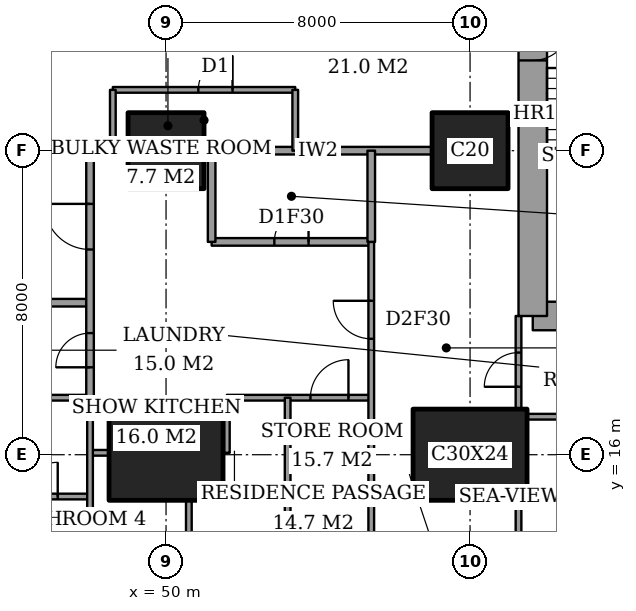
"""IFC4 building model, lengths in metres.
Left out: names, types, materials, properties, quantities, classifications, styles, units other than length and angle.
Written with IfcOpenShell. Run it as: python <this file> out.ifc"""

import sys

from ifc_helpers import new_model, si_unit, direction, frame, frame_2d, origin, origin_2d, place, context, subcontext, project, spatial, rectangle, extrude, element, fill, save


model = new_model("IFC4")
c1 = context("Model", 3, precision=1e-05, world=origin(), true_north=direction((0.0, 1.0)))
c2 = subcontext(c1, "Body", "Model", "MODEL_VIEW")
j1 = project(units=[si_unit("LENGTHUNIT", "METRE"), si_unit("PLANEANGLEUNIT", "RADIAN")], contexts=[c1])
p1 = place(None, origin())
s1 = spatial("IfcSite", under=j1, at=p1, CompositionType="ELEMENT")
p2 = place(p1, origin())
s2 = spatial("IfcBuilding", under=s1, at=p2, CompositionType="ELEMENT")
p3 = place(p2, frame((0.0, 0.0, 47.6)))
s3 = spatial("IfcBuildingStorey", under=s2, at=p3, CompositionType="ELEMENT", Elevation=47.6)
p4 = place(p3, frame((50.0, 16.0, 0.0), z_axis=(0.0, 0.0, 1.0), x_axis=(1.0, 0.0, 0.0)))
e1 = element("IfcColumn", 1, at=p4, inside=s3, PredefinedType="COLUMN", context=c2, shape_type="SweptSolid", body=[
    extrude(rectangle(XDim=3.0, YDim=2.4, at=origin_2d()), origin(), (0.0, 0.0, 1.0), 3.6),
])
p5 = place(p3, frame((50.0, 24.0, 0.0), z_axis=(0.0, 0.0, 1.0), x_axis=(1.0, 0.0, 0.0)))
e2 = element("IfcColumn", 2, at=p5, inside=s3, PredefinedType="COLUMN", context=c2, shape_type="SweptSolid", body=[
    extrude(rectangle(XDim=2.0, YDim=2.0, at=origin_2d()), origin(), (0.0, 0.0, 1.0), 3.6),
])
p6 = place(p3, frame((58.0, 16.0, 0.0), z_axis=(0.0, 0.0, 1.0), x_axis=(1.0, 0.0, 0.0)))
e3 = element("IfcColumn", 3, at=p6, inside=s3, PredefinedType="COLUMN", context=c2, shape_type="SweptSolid", body=[
    extrude(rectangle(XDim=3.0, YDim=2.4, at=origin_2d()), origin(), (0.0, 0.0, 1.0), 3.6),
])
p7 = place(p3, frame((58.0, 24.0, 0.0), z_axis=(0.0, 0.0, 1.0), x_axis=(1.0, 0.0, 0.0)))
e4 = element("IfcColumn", 4, at=p7, inside=s3, PredefinedType="COLUMN", context=c2, shape_type="SweptSolid", body=[
    extrude(rectangle(XDim=2.0, YDim=2.0, at=origin_2d()), origin(), (0.0, 0.0, 1.0), 3.6),
])
p8 = place(p3, frame((59.65, 19.65, 0.0), z_axis=(0.0, 0.0, 1.0), x_axis=(1.0, 0.0, 0.0)))
e5 = element("IfcWall", 5, at=p8, inside=s3, PredefinedType="SHEAR", context=c2, shape_type="SweptSolid", body=[
    extrude(rectangle(XDim=4.45, YDim=0.75, at=frame_2d((2.225, 0.0))), origin(), (0.0, 0.0, 1.0), 3.6),
])
p9 = place(p3, frame((59.65, 28.35, 0.0), z_axis=(0.0, 0.0, 1.0), x_axis=(0.0, -1.0, 0.0)))
e6 = element("IfcWall", 6, at=p9, inside=s3, PredefinedType="SHEAR", context=c2, shape_type="SweptSolid", body=[
    extrude(rectangle(XDim=8.7, YDim=0.75, at=frame_2d((4.35, 0.0))), origin(), (0.0, 0.0, 1.0), 3.6),
])
p10 = place(p9, frame((0.975, 0.0, 0.0)))
e7 = element("IfcOpeningElement", 7, at=p10, cuts=e6, PredefinedType="OPENING", context=c2, shape_type="SweptSolid", body=[
    extrude(rectangle(XDim=1.0, YDim=2.1, at=frame_2d((0.5, 1.05))), frame((0.0, 0.385, 0.0), z_axis=(0.0, -1.0, 0.0), x_axis=(1.0, 0.0, 0.0)), (0.0, 0.0, 1.0), 0.77),
])
p11 = place(p3, frame((45.4, 14.9, 0.0), z_axis=(0.0, 0.0, 1.0), x_axis=(1.0, 0.0, 0.0)))
e8 = element("IfcWall", 8, at=p11, inside=s3, PredefinedType="PARTITIONING", context=c2, shape_type="SweptSolid", body=[
    extrude(rectangle(XDim=2.6, YDim=0.15, at=frame_2d((1.3, 0.0))), origin(), (0.0, 0.0, 1.0), 3.35),
])
p12 = place(p11, frame((0.85, 0.0, 0.0)))
e9 = element("IfcOpeningElement", 9, at=p12, cuts=e8, PredefinedType="OPENING", context=c2, shape_type="SweptSolid", body=[
    extrude(rectangle(XDim=0.9, YDim=2.1, at=frame_2d((0.45, 1.05))), frame((0.0, 0.085, 0.0), z_axis=(0.0, -1.0, 0.0), x_axis=(1.0, 0.0, 0.0)), (0.0, 0.0, 1.0), 0.17),
])
p13 = place(p3, frame((55.4, 15.0, 0.0), z_axis=(0.0, 0.0, 1.0), x_axis=(1.0, 0.0, 0.0)))
e10 = element("IfcWall", 10, at=p13, inside=s3, PredefinedType="PARTITIONING", context=c2, shape_type="SweptSolid", body=[
    extrude(rectangle(XDim=1.1, YDim=0.15, at=frame_2d((0.55, 0.0))), origin(), (0.0, 0.0, 1.0), 3.35),
])
p14 = place(p3, frame((48.0, 16.05, 0.0), z_axis=(0.0, 0.0, 1.0), x_axis=(1.0, 0.0, 0.0)))
e11 = element("IfcWall", 11, at=p14, inside=s3, PredefinedType="PARTITIONING", context=c2, shape_type="SweptSolid", body=[
    extrude(rectangle(XDim=0.5, YDim=0.15, at=frame_2d((0.25, 0.0))), origin(), (0.0, 0.0, 1.0), 2.634),
])
p15 = place(p3, frame((59.5, 17.0, 0.0), z_axis=(0.0, 0.0, 1.0), x_axis=(1.0, 0.0, 0.0)))
e12 = element("IfcWall", 12, at=p15, inside=s3, PredefinedType="PARTITIONING", context=c2, shape_type="SweptSolid", body=[
    extrude(rectangle(XDim=5.15, YDim=0.15, at=frame_2d((2.575, 0.0))), origin(), (0.0, 0.0, 1.0), 3.35),
])
p16 = place(p3, frame((42.0, 17.5, 0.0), z_axis=(0.0, 0.0, 1.0), x_axis=(1.0, 0.0, 0.0)))
e13 = element("IfcWall", 13, at=p16, inside=s3, PredefinedType="PARTITIONING", context=c2, shape_type="SweptSolid", body=[
    extrude(rectangle(XDim=6.0, YDim=0.15, at=frame_2d((3.0, 0.0))), origin(), (0.0, 0.0, 1.0), 3.35),
])
p17 = place(p3, frame((51.6, 17.5, 0.0), z_axis=(0.0, 0.0, 1.0), x_axis=(1.0, 0.0, 0.0)))
e14 = element("IfcWall", 14, at=p17, inside=s3, PredefinedType="PARTITIONING", context=c2, shape_type="SweptSolid", body=[
    extrude(rectangle(XDim=3.8, YDim=0.15, at=frame_2d((1.9, 0.0))), origin(), (0.0, 0.0, 1.0), 3.35),
])
p18 = place(p17, frame((2.2, 0.0, 0.0)))
e15 = element("IfcOpeningElement", 15, at=p18, cuts=e14, PredefinedType="OPENING", context=c2, shape_type="SweptSolid", body=[
    extrude(rectangle(XDim=1.0, YDim=2.1, at=frame_2d((0.5, 1.05))), frame((0.0, 0.085, 0.0), z_axis=(0.0, -1.0, 0.0), x_axis=(1.0, 0.0, 0.0)), (0.0, 0.0, 1.0), 0.17),
])
p19 = place(p3, frame((42.0, 20.0, 0.0), z_axis=(0.0, 0.0, 1.0), x_axis=(1.0, 0.0, 0.0)))
e16 = element("IfcWall", 16, at=p19, inside=s3, PredefinedType="PARTITIONING", context=c2, shape_type="SweptSolid", body=[
    extrude(rectangle(XDim=6.0, YDim=0.2, at=frame_2d((3.0, 0.0))), origin(), (0.0, 0.0, 1.0), 3.35),
])
p20 = place(p3, frame((51.2, 21.6, 0.0), z_axis=(0.0, 0.0, 1.0), x_axis=(1.0, 0.0, 0.0)))
e17 = element("IfcWall", 17, at=p20, inside=s3, PredefinedType="PARTITIONING", context=c2, shape_type="SweptSolid", body=[
    extrude(rectangle(XDim=4.2, YDim=0.2, at=frame_2d((2.1, 0.0))), origin(), (0.0, 0.0, 1.0), 3.35),
])
p21 = place(p20, frame((1.65, 0.0, 0.0)))
e18 = element("IfcOpeningElement", 18, at=p21, cuts=e17, PredefinedType="OPENING", context=c2, shape_type="SweptSolid", body=[
    extrude(rectangle(XDim=0.9, YDim=2.1, at=frame_2d((0.45, 1.05))), frame((0.0, 0.11, 0.0), z_axis=(0.0, -1.0, 0.0), x_axis=(1.0, 0.0, 0.0)), (0.0, 0.0, 1.0), 0.22),
])
p22 = place(p3, frame((48.0, 24.0, 0.0), z_axis=(0.0, 0.0, 1.0), x_axis=(1.0, 0.0, 0.0)))
e19 = element("IfcWall", 19, at=p22, inside=s3, PredefinedType="PARTITIONING", context=c2, shape_type="SweptSolid", body=[
    extrude(rectangle(XDim=1.0, YDim=0.2, at=frame_2d((0.5, 0.0))), origin(), (0.0, 0.0, 1.0), 3.35),
])
p23 = place(p3, frame((51.0, 24.0, 0.0), z_axis=(0.0, 0.0, 1.0), x_axis=(1.0, 0.0, 0.0)))
e20 = element("IfcWall", 20, at=p23, inside=s3, PredefinedType="PARTITIONING", context=c2, shape_type="SweptSolid", body=[
    extrude(rectangle(XDim=6.0, YDim=0.2, at=frame_2d((3.0, 0.0))), origin(), (0.0, 0.0, 1.0), 3.35),
])
p24 = place(p3, frame((48.6, 25.6, 0.0), z_axis=(0.0, 0.0, 1.0), x_axis=(1.0, 0.0, 0.0)))
e21 = element("IfcWall", 21, at=p24, inside=s3, PredefinedType="PARTITIONING", context=c2, shape_type="SweptSolid", body=[
    extrude(rectangle(XDim=4.8, YDim=0.15, at=frame_2d((2.4, 0.0))), origin(), (0.0, 0.0, 1.0), 3.35),
])
p25 = place(p24, frame((2.25, 0.0, 0.0)))
e22 = element("IfcOpeningElement", 22, at=p25, cuts=e21, PredefinedType="OPENING", context=c2, shape_type="SweptSolid", body=[
    extrude(rectangle(XDim=0.9, YDim=2.1, at=frame_2d((0.45, 1.05))), frame((0.0, 0.085, 0.0), z_axis=(0.0, -1.0, 0.0), x_axis=(1.0, 0.0, 0.0)), (0.0, 0.0, 1.0), 0.17),
])
p26 = place(p3, frame((48.0, 17.5, 0.0), z_axis=(0.0, 0.0, 1.0), x_axis=(0.0, 1.0, 0.0)))
e23 = element("IfcWall", 23, at=p26, inside=s3, PredefinedType="PARTITIONING", context=c2, shape_type="SweptSolid", body=[
    extrude(rectangle(XDim=6.5, YDim=0.2, at=frame_2d((3.25, 0.0))), origin(), (0.0, 0.0, 1.0), 3.35),
])
p27 = place(p26, frame((3.9, 0.0, 0.0)))
e24 = element("IfcOpeningElement", 24, at=p27, cuts=e23, PredefinedType="OPENING", context=c2, shape_type="SweptSolid", body=[
    extrude(rectangle(XDim=1.2, YDim=2.4, at=frame_2d((0.6, 1.2))), frame((0.0, 0.11, 0.0), z_axis=(0.0, -1.0, 0.0), x_axis=(1.0, 0.0, 0.0)), (0.0, 0.0, 1.0), 0.22),
])
p28 = place(p26, frame((0.8, 0.0, 0.0)))
e25 = element("IfcOpeningElement", 25, at=p28, cuts=e23, PredefinedType="OPENING", context=c2, shape_type="SweptSolid", body=[
    extrude(rectangle(XDim=0.9, YDim=2.1, at=frame_2d((0.45, 1.05))), frame((0.0, 0.11, 0.0), z_axis=(0.0, -1.0, 0.0), x_axis=(1.0, 0.0, 0.0)), (0.0, 0.0, 1.0), 0.22),
])
p29 = place(p3, frame((48.0, 10.8, 0.0), z_axis=(0.0, 0.0, 1.0), x_axis=(0.0, 1.0, 0.0)))
e26 = element("IfcWall", 26, at=p29, inside=s3, PredefinedType="PARTITIONING", context=c2, shape_type="SweptSolid", body=[
    extrude(rectangle(XDim=6.7, YDim=0.15, at=frame_2d((3.35, 0.0))), origin(), (0.0, 0.0, 1.0), 3.35),
])
p30 = place(p3, frame((48.6, 24.0, 0.0), z_axis=(0.0, 0.0, 1.0), x_axis=(0.0, 1.0, 0.0)))
e27 = element("IfcWall", 27, at=p30, inside=s3, PredefinedType="PARTITIONING", context=c2, shape_type="SweptSolid", body=[
    extrude(rectangle(XDim=1.6, YDim=0.15, at=frame_2d((0.8, 0.0))), origin(), (0.0, 0.0, 1.0), 3.35),
])
p31 = place(p3, frame((50.6, 10.8, 0.0), z_axis=(0.0, 0.0, 1.0), x_axis=(0.0, 1.0, 0.0)))
e28 = element("IfcWall", 28, at=p31, inside=s3, PredefinedType="PARTITIONING", context=c2, shape_type="SweptSolid", body=[
    extrude(rectangle(XDim=4.0, YDim=0.15, at=frame_2d((2.0, 0.0))), origin(), (0.0, 0.0, 1.0), 3.35),
])
p32 = place(p3, frame((51.2, 21.6, 0.0), z_axis=(0.0, 0.0, 1.0), x_axis=(0.0, 1.0, 0.0)))
e29 = element("IfcWall", 29, at=p32, inside=s3, PredefinedType="PARTITIONING", context=c2, shape_type="SweptSolid", body=[
    extrude(rectangle(XDim=2.4, YDim=0.2, at=frame_2d((1.2, 0.0))), origin(), (0.0, 0.0, 1.0), 3.35),
])
p33 = place(p3, frame((51.6, 16.05, 0.0), z_axis=(0.0, 0.0, 1.0), x_axis=(0.0, 1.0, 0.0)))
e30 = element("IfcWall", 30, at=p33, inside=s3, PredefinedType="PARTITIONING", context=c2, shape_type="SweptSolid", body=[
    extrude(rectangle(XDim=1.45, YDim=0.15, at=frame_2d((0.725, 0.0))), origin(), (0.0, 0.0, 1.0), 3.35),
])
p34 = place(p3, frame((53.2, 10.8, 0.0), z_axis=(0.0, 0.0, 1.0), x_axis=(0.0, 1.0, 0.0)))
e31 = element("IfcWall", 31, at=p34, inside=s3, PredefinedType="PARTITIONING", context=c2, shape_type="SweptSolid", body=[
    extrude(rectangle(XDim=6.7, YDim=0.15, at=frame_2d((3.35, 0.0))), origin(), (0.0, 0.0, 1.0), 3.35),
])
p35 = place(p3, frame((53.4, 24.0, 0.0), z_axis=(0.0, 0.0, 1.0), x_axis=(0.0, 1.0, 0.0)))
e32 = element("IfcWall", 32, at=p35, inside=s3, PredefinedType="PARTITIONING", context=c2, shape_type="SweptSolid", body=[
    extrude(rectangle(XDim=1.6, YDim=0.15, at=frame_2d((0.8, 0.0))), origin(), (0.0, 0.0, 1.0), 3.35),
])
p36 = place(p3, frame((55.4, 21.6, 0.0), z_axis=(0.0, 0.0, 1.0), x_axis=(0.0, 1.0, 0.0)))
e33 = element("IfcWall", 33, at=p36, inside=s3, PredefinedType="PARTITIONING", context=c2, shape_type="SweptSolid", body=[
    extrude(rectangle(XDim=2.4, YDim=0.2, at=frame_2d((1.2, 0.0))), origin(), (0.0, 0.0, 1.0), 3.35),
])
p37 = place(p3, frame((55.4, 10.8, 0.0), z_axis=(0.0, 0.0, 1.0), x_axis=(0.0, 1.0, 0.0)))
e34 = element("IfcWall", 34, at=p37, inside=s3, PredefinedType="PARTITIONING", context=c2, shape_type="SweptSolid", body=[
    extrude(rectangle(XDim=10.8, YDim=0.15, at=frame_2d((5.4, 0.0))), origin(), (0.0, 0.0, 1.0), 3.35),
])
p38 = place(p37, frame((8.25, 0.0, 0.0)))
e35 = element("IfcOpeningElement", 35, at=p38, cuts=e34, PredefinedType="OPENING", context=c2, shape_type="SweptSolid", body=[
    extrude(rectangle(XDim=1.0, YDim=2.1, at=frame_2d((0.5, 1.05))), frame((0.0, 0.085, 0.0), z_axis=(0.0, -1.0, 0.0), x_axis=(1.0, 0.0, 0.0)), (0.0, 0.0, 1.0), 0.17),
])
p39 = place(p3, frame((59.275, 10.8, 0.0), z_axis=(0.0, 0.0, 1.0), x_axis=(0.0, 1.0, 0.0)))
e36 = element("IfcWall", 36, at=p39, inside=s3, PredefinedType="PARTITIONING", context=c2, shape_type="SweptSolid", body=[
    extrude(rectangle(XDim=4.0, YDim=0.15, at=frame_2d((2.0, 0.0))), origin(), (0.0, 0.0, 1.0), 3.35),
])
p40 = place(p3, frame((59.275, 17.2, 0.0), z_axis=(0.0, 0.0, 1.0), x_axis=(0.0, 1.0, 0.0)))
e37 = element("IfcWall", 37, at=p40, inside=s3, PredefinedType="PARTITIONING", context=c2, shape_type="SweptSolid", body=[
    extrude(rectangle(XDim=2.45, YDim=0.15, at=frame_2d((1.225, 0.0))), origin(), (0.0, 0.0, 1.0), 3.35),
])
p41 = place(p40, frame((0.587, 0.0, 0.0)))
e38 = element("IfcOpeningElement", 38, at=p41, cuts=e37, PredefinedType="OPENING", context=c2, shape_type="SweptSolid", body=[
    extrude(rectangle(XDim=0.9, YDim=2.1, at=frame_2d((0.45, 1.05))), frame((0.0, 0.085, 0.0), z_axis=(0.0, -1.0, 0.0), x_axis=(1.0, 0.0, 0.0)), (0.0, 0.0, 1.0), 0.17),
])
p42 = place(p41, origin())
e39 = element("IfcDoor", 39, at=p42, inside=s3, OperationType="SINGLE_SWING_RIGHT", PredefinedType="DOOR", context=c2, shape_type="SweptSolid", body=[
    extrude(rectangle(XDim=0.9, YDim=2.1, at=frame_2d((0.45, 1.05))), frame((0.0, 0.025, 0.0), z_axis=(0.0, -1.0, 0.0), x_axis=(1.0, 0.0, 0.0)), (0.0, 0.0, 1.0), 0.05),
])
fill(e38, e39)
p43 = place(p38, origin())
e40 = element("IfcDoor", 40, at=p43, inside=s3, OperationType="SINGLE_SWING_LEFT", PredefinedType="DOOR", context=c2, shape_type="SweptSolid", body=[
    extrude(rectangle(XDim=1.0, YDim=2.1, at=frame_2d((0.5, 1.05))), frame((0.0, 0.025, 0.0), z_axis=(0.0, -1.0, 0.0), x_axis=(1.0, 0.0, 0.0)), (0.0, 0.0, 1.0), 0.05),
])
fill(e35, e40)
p44 = place(p21, origin())
e41 = element("IfcDoor", 41, at=p44, inside=s3, OperationType="SINGLE_SWING_LEFT", PredefinedType="DOOR", context=c2, shape_type="SweptSolid", body=[
    extrude(rectangle(XDim=0.9, YDim=2.1, at=frame_2d((0.45, 1.05))), frame((0.0, 0.025, 0.0), z_axis=(0.0, -1.0, 0.0), x_axis=(1.0, 0.0, 0.0)), (0.0, 0.0, 1.0), 0.05),
])
fill(e18, e41)
p45 = place(p27, origin())
e42 = element("IfcDoor", 42, at=p45, inside=s3, OperationType="SINGLE_SWING_LEFT", PredefinedType="DOOR", context=c2, shape_type="SweptSolid", body=[
    extrude(rectangle(XDim=1.2, YDim=2.4, at=frame_2d((0.6, 1.2))), frame((0.0, 0.025, 0.0), z_axis=(0.0, -1.0, 0.0), x_axis=(1.0, 0.0, 0.0)), (0.0, 0.0, 1.0), 0.05),
])
fill(e24, e42)
p46 = place(p18, origin())
e43 = element("IfcDoor", 43, at=p46, inside=s3, OperationType="SINGLE_SWING_LEFT", PredefinedType="DOOR", context=c2, shape_type="SweptSolid", body=[
    extrude(rectangle(XDim=1.0, YDim=2.1, at=frame_2d((0.5, 1.05))), frame((0.0, 0.025, 0.0), z_axis=(0.0, -1.0, 0.0), x_axis=(1.0, 0.0, 0.0)), (0.0, 0.0, 1.0), 0.05),
])
fill(e15, e43)
p47 = place(p12, origin())
e44 = element("IfcDoor", 44, at=p47, inside=s3, OperationType="SINGLE_SWING_LEFT", PredefinedType="DOOR", context=c2, shape_type="SweptSolid", body=[
    extrude(rectangle(XDim=0.9, YDim=2.1, at=frame_2d((0.45, 1.05))), frame((0.0, 0.025, 0.0), z_axis=(0.0, -1.0, 0.0), x_axis=(1.0, 0.0, 0.0)), (0.0, 0.0, 1.0), 0.05),
])
fill(e9, e44)
p48 = place(p28, origin())
e45 = element("IfcDoor", 45, at=p48, inside=s3, OperationType="SINGLE_SWING_RIGHT", PredefinedType="DOOR", context=c2, shape_type="SweptSolid", body=[
    extrude(rectangle(XDim=0.9, YDim=2.1, at=frame_2d((0.45, 1.05))), frame((0.0, 0.025, 0.0), z_axis=(0.0, -1.0, 0.0), x_axis=(1.0, 0.0, 0.0)), (0.0, 0.0, 1.0), 0.05),
])
fill(e25, e45)
p49 = place(p25, origin())
e46 = element("IfcDoor", 46, at=p49, inside=s3, OperationType="SINGLE_SWING_LEFT", PredefinedType="DOOR", context=c2, shape_type="SweptSolid", body=[
    extrude(rectangle(XDim=0.9, YDim=2.1, at=frame_2d((0.45, 1.05))), frame((0.0, 0.025, 0.0), z_axis=(0.0, -1.0, 0.0), x_axis=(1.0, 0.0, 0.0)), (0.0, 0.0, 1.0), 0.05),
])
fill(e22, e46)
p50 = place(p10, origin())
e47 = element("IfcDoor", 47, at=p50, inside=s3, OperationType="SINGLE_SWING_RIGHT", PredefinedType="DOOR", context=c2, shape_type="SweptSolid", body=[
    extrude(rectangle(XDim=1.0, YDim=2.1, at=frame_2d((0.5, 1.05))), frame((0.0, 0.025, 0.0), z_axis=(0.0, -1.0, 0.0), x_axis=(1.0, 0.0, 0.0)), (0.0, 0.0, 1.0), 0.05),
])
fill(e7, e47)
save(model, sys.argv[1])
